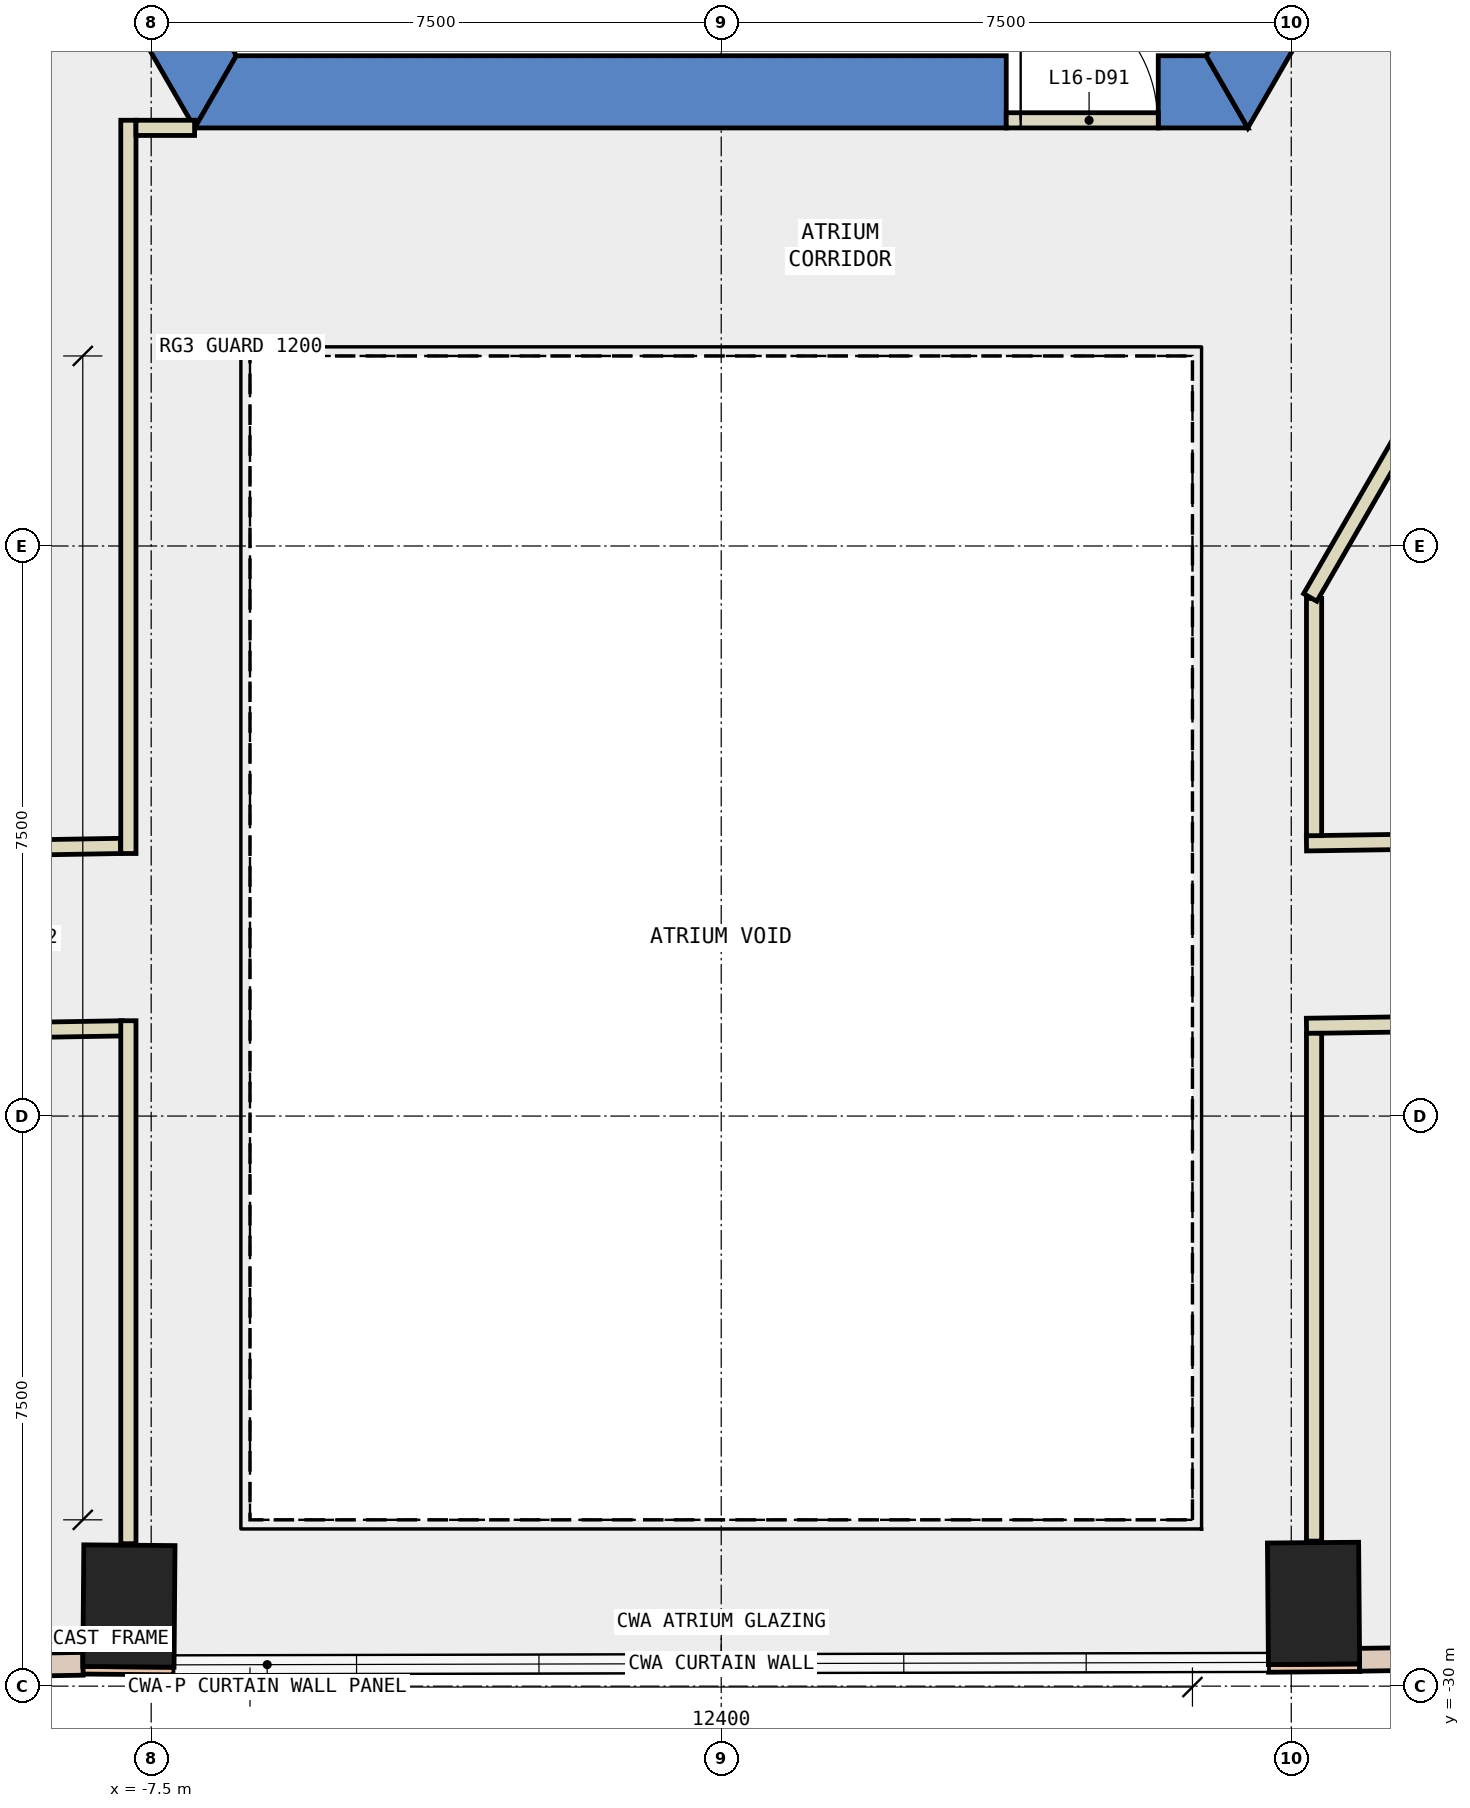
"""IFC4 building model, lengths in metres.
Left out: names, types, materials, properties, quantities, classifications, styles, units other than length and angle.
Written with IfcOpenShell. Run it as: python <this file> out.ifc"""

import sys

from ifc_helpers import new_model, si_unit, direction, frame, frame_2d, origin, origin_2d, place, context, subcontext, project, spatial, polyline, rectangle, outline, extrude, element, fill, save


model = new_model("IFC4")
c1 = context("Model", 3, precision=1e-05, world=origin(), true_north=direction((0.0, 1.0)))
c2 = subcontext(c1, "Body", "Model", "MODEL_VIEW")
j1 = project(units=[si_unit("LENGTHUNIT", "METRE"), si_unit("PLANEANGLEUNIT", "RADIAN")], contexts=[c1])
p1 = place(None, origin())
s1 = spatial("IfcSite", under=j1, at=p1, CompositionType="ELEMENT")
p2 = place(p1, origin())
s2 = spatial("IfcBuilding", under=s1, at=p2, CompositionType="ELEMENT")
p3 = place(p2, frame((0.0, 0.0, 77.0)))
s3 = spatial("IfcBuildingStorey", under=s2, at=p3, CompositionType="ELEMENT", Elevation=77.0)
for number, where, z_axis, x_axis in (
    (1, (-7.793, -28.946, -0.4), (0.0, 0.0, 1.0), (-1.0, 0.008, 0.0)),
    (2, (7.793, -28.912, -0.4), (0.0, 0.0, 1.0), (1.0, 0.008, 0.0)),
):
    element("IfcColumn", number, at=place(p3, frame(where, z_axis=z_axis, x_axis=x_axis)), inside=s3, PredefinedType="COLUMN", context=c2, shape_type="SweptSolid", body=[
        extrude(rectangle(XDim=1.2, YDim=1.6, at=origin_2d()), origin(), (0.0, 0.0, 1.0), 4.0),
    ])
p4 = place(p3, frame((0.0, 0.0, -0.4)))
e3 = element("IfcWall", 3, at=p4, inside=s3, PredefinedType="SHEAR", context=c2, shape_type="SweptSolid", body=[
    extrude(outline(polyline([(-13.856, 2.5), (-6.928, -9.5), (-6.38, -8.55), (-12.759, 2.5), (-13.856, 2.5)])), origin(), (0.0, 0.0, 1.0), 4.0),
])
p5 = place(p3, frame((0.0, 0.0, -0.4)))
e4 = element("IfcWall", 4, at=p5, inside=s3, PredefinedType="SHEAR", context=c2, shape_type="SweptSolid", body=[
    extrude(outline(polyline([(3.75, -9.5), (3.75, -8.55), (-6.38, -8.55), (-6.928, -9.5), (3.75, -9.5)])), origin(), (0.0, 0.0, 1.0), 4.0),
])
p6 = place(p3, frame((0.0, 0.0, -0.4)))
e5 = element("IfcWall", 5, at=p6, inside=s3, PredefinedType="SHEAR", context=c2, shape_type="SweptSolid", body=[
    extrude(outline(polyline([(5.75, -8.55), (5.75, -9.5), (6.928, -9.5), (6.38, -8.55), (5.75, -8.55)])), origin(), (0.0, 0.0, 1.0), 4.0),
])
p7 = place(p3, frame((0.0, 0.0, -0.4)))
e6 = element("IfcWall", 6, at=p7, inside=s3, PredefinedType="SHEAR", context=c2, shape_type="SweptSolid", body=[
    extrude(outline(polyline([(8.117, -7.44), (7.295, -6.965), (6.38, -8.55), (6.928, -9.5), (8.117, -7.44)])), origin(), (0.0, 0.0, 1.0), 4.0),
])
for number, where, z_axis, x_axis in (
    (7, (-8.4, -29.791, 0.0), (0.0, 0.0, 1.0), (1.0, -0.008, 0.0)),
    (8, (7.2, -29.767, 0.0), (0.0, 0.0, 1.0), (1.0, 0.008, 0.0)),
):
    element("IfcWall", number, at=place(p3, frame(where, z_axis=z_axis, x_axis=x_axis)), inside=s3, PredefinedType="STANDARD", context=c2, shape_type="SweptSolid", body=[
        extrude(rectangle(XDim=1.2, YDim=0.1, at=frame_2d((0.6, 0.0))), origin(), (0.0, 0.0, 1.0), 3.6),
    ])
p8 = place(p3, frame((-15.567, -29.827, 0.0), z_axis=(0.0, 0.0, 1.0), x_axis=(0.999857944706, 0.0168549817, 0.0)))
e9 = element("IfcWall", 9, at=p8, inside=s3, PredefinedType="STANDARD", context=c2, shape_type="SweptSolid", body=[
    extrude(rectangle(XDim=7.17, YDim=0.3, at=frame_2d((3.585, 0.0))), origin(), (0.0, 0.0, 1.0), 3.6),
])
p9 = place(p8, frame((0.593, 0.0, 0.9)))
e10 = element("IfcOpeningElement", 10, at=p9, cuts=e9, PredefinedType="OPENING", context=c2, shape_type="SweptSolid", body=[
    extrude(rectangle(XDim=2.4, YDim=2.6, at=frame_2d((1.2, 1.3))), frame((0.0, 0.16, 0.0), z_axis=(0.0, -1.0, 0.0), x_axis=(1.0, 0.0, 0.0)), (0.0, 0.0, 1.0), 0.32),
])
p10 = place(p8, frame((4.178, 0.0, 0.9)))
e11 = element("IfcOpeningElement", 11, at=p10, cuts=e9, PredefinedType="OPENING", context=c2, shape_type="SweptSolid", body=[
    extrude(rectangle(XDim=2.4, YDim=2.6, at=frame_2d((1.2, 1.3))), frame((0.0, 0.16, 0.0), z_axis=(0.0, -1.0, 0.0), x_axis=(1.0, 0.0, 0.0)), (0.0, 0.0, 1.0), 0.32),
])
p11 = place(p3, frame((8.398, -29.653, 0.0), z_axis=(0.0, 0.0, 1.0), x_axis=(0.999888301342, 0.014946064363, 0.0)))
e12 = element("IfcWall", 12, at=p11, inside=s3, PredefinedType="STANDARD", context=c2, shape_type="SweptSolid", body=[
    extrude(rectangle(XDim=7.171, YDim=0.3, at=frame_2d((3.585, 0.0))), origin(), (0.0, 0.0, 1.0), 3.6),
])
p12 = place(p11, frame((0.593, 0.0, 0.9)))
e13 = element("IfcOpeningElement", 13, at=p12, cuts=e12, PredefinedType="OPENING", context=c2, shape_type="SweptSolid", body=[
    extrude(rectangle(XDim=2.4, YDim=2.6, at=frame_2d((1.2, 1.3))), frame((0.0, 0.16, 0.0), z_axis=(0.0, -1.0, 0.0), x_axis=(1.0, 0.0, 0.0)), (0.0, 0.0, 1.0), 0.32),
])
p13 = place(p11, frame((4.178, 0.0, 0.9)))
e14 = element("IfcOpeningElement", 14, at=p13, cuts=e12, PredefinedType="OPENING", context=c2, shape_type="SweptSolid", body=[
    extrude(rectangle(XDim=2.4, YDim=2.6, at=frame_2d((1.2, 1.3))), frame((0.0, 0.16, 0.0), z_axis=(0.0, -1.0, 0.0), x_axis=(1.0, 0.0, 0.0)), (0.0, 0.0, 1.0), 0.32),
])
p14 = place(p3, frame((7.7, -18.912, 0.0), z_axis=(0.0, 0.0, 1.0), x_axis=(0.999888819649, 0.014911349423, 0.0)))
e15 = element("IfcWall", 15, at=p14, inside=s3, PredefinedType="PARTITIONING", context=c2, shape_type="SweptSolid", body=[
    extrude(rectangle(XDim=8.252, YDim=0.2, at=frame_2d((4.126, 0.0))), origin(), (0.0, 0.0, 1.0), 3.6),
])
p15 = place(p14, frame((3.626, 0.0, 0.0)))
e16 = element("IfcOpeningElement", 16, at=p15, cuts=e15, PredefinedType="OPENING", context=c2, shape_type="SweptSolid", body=[
    extrude(rectangle(XDim=1.0, YDim=2.1, at=frame_2d((0.5, 1.05))), frame((0.0, 0.11, 0.0), z_axis=(0.0, -1.0, 0.0), x_axis=(1.0, 0.0, 0.0)), (0.0, 0.0, 1.0), 0.22),
])
p16 = place(p3, frame((-16.298, -19.088, 0.0), z_axis=(0.0, 0.0, 1.0), x_axis=(0.999857252997, 0.016895964865, 0.0)))
e17 = element("IfcWall", 17, at=p16, inside=s3, PredefinedType="PARTITIONING", context=c2, shape_type="SweptSolid", body=[
    extrude(rectangle(XDim=8.395, YDim=0.2, at=frame_2d((4.198, 0.0))), origin(), (0.0, 0.0, 1.0), 3.6),
])
p17 = place(p16, frame((3.298, 0.0, 0.0)))
e18 = element("IfcOpeningElement", 18, at=p17, cuts=e17, PredefinedType="OPENING", context=c2, shape_type="SweptSolid", body=[
    extrude(rectangle(XDim=1.8, YDim=2.1, at=frame_2d((0.9, 1.05))), frame((0.0, 0.11, 0.0), z_axis=(0.0, -1.0, 0.0), x_axis=(1.0, 0.0, 0.0)), (0.0, 0.0, 1.0), 0.22),
])
p18 = place(p3, frame((15.999, -21.189, 0.0), z_axis=(0.0, 0.0, 1.0), x_axis=(-0.999888353348, -0.014942584753, 0.0)))
e19 = element("IfcWall", 19, at=p18, inside=s3, PredefinedType="PARTITIONING", context=c2, shape_type="SweptSolid", body=[
    extrude(rectangle(XDim=8.3, YDim=0.2, at=frame_2d((4.15, 0.0))), origin(), (0.0, 0.0, 1.0), 3.6),
])
p19 = place(p18, frame((3.55, 0.0, 0.0)))
e20 = element("IfcOpeningElement", 20, at=p19, cuts=e19, PredefinedType="OPENING", context=c2, shape_type="SweptSolid", body=[
    extrude(rectangle(XDim=1.0, YDim=2.1, at=frame_2d((0.5, 1.05))), frame((0.0, 0.11, 0.0), z_axis=(0.0, -1.0, 0.0), x_axis=(1.0, 0.0, 0.0)), (0.0, 0.0, 1.0), 0.22),
])
p20 = place(p3, frame((-7.881, -21.346, 0.0), z_axis=(0.0, 0.0, 1.0), x_axis=(-0.999857974935, -0.016853188395, 0.0)))
e21 = element("IfcWall", 21, at=p20, inside=s3, PredefinedType="PARTITIONING", context=c2, shape_type="SweptSolid", body=[
    extrude(rectangle(XDim=8.315, YDim=0.2, at=frame_2d((4.158, 0.0))), origin(), (0.0, 0.0, 1.0), 3.6),
])
p21 = place(p20, frame((3.732, 0.0, 0.0)))
e22 = element("IfcOpeningElement", 22, at=p21, cuts=e21, PredefinedType="OPENING", context=c2, shape_type="SweptSolid", body=[
    extrude(rectangle(XDim=1.0, YDim=2.1, at=frame_2d((0.5, 1.05))), frame((0.0, 0.11, 0.0), z_axis=(0.0, -1.0, 0.0), x_axis=(1.0, 0.0, 0.0)), (0.0, 0.0, 1.0), 0.22),
])
p22 = place(p3, frame((7.8, -15.69, 0.0), z_axis=(0.0, 0.0, 1.0), x_axis=(0.0, -1.0, 0.0)))
e23 = element("IfcWall", 23, at=p22, inside=s3, PredefinedType="PARTITIONING", context=c2, shape_type="SweptSolid", body=[
    extrude(rectangle(XDim=3.121, YDim=0.2, at=frame_2d((1.561, 0.0))), origin(), (0.0, 0.0, 1.0), 3.6),
])
p23 = place(p3, frame((-7.8, -19.046, 0.0), z_axis=(0.0, 0.0, 1.0), x_axis=(0.0, 1.0, 0.0)))
e24 = element("IfcWall", 24, at=p23, inside=s3, PredefinedType="PARTITIONING", context=c2, shape_type="SweptSolid", body=[
    extrude(rectangle(XDim=9.647, YDim=0.2, at=frame_2d((4.823, 0.0))), origin(), (0.0, 0.0, 1.0), 3.6),
])
p24 = place(p3, frame((-7.7, -9.499, 0.0), z_axis=(0.0, 0.0, 1.0), x_axis=(1.0, 0.0, 0.0)))
e25 = element("IfcWall", 25, at=p24, inside=s3, PredefinedType="PARTITIONING", context=c2, shape_type="SweptSolid", body=[
    extrude(rectangle(XDim=0.771, YDim=0.2, at=frame_2d((0.385, 0.0))), origin(), (0.0, 0.0, 1.0), 3.6),
])
p25 = place(p3, frame((7.8, -21.411, 0.0), z_axis=(0.0, 0.0, 1.0), x_axis=(0.0, -1.0, 0.0)))
e26 = element("IfcWall", 26, at=p25, inside=s3, PredefinedType="PARTITIONING", context=c2, shape_type="SweptSolid", body=[
    extrude(rectangle(XDim=6.681, YDim=0.2, at=frame_2d((3.341, 0.0))), origin(), (0.0, 0.0, 1.0), 3.6),
])
p26 = place(p3, frame((-7.8, -28.126, 0.0), z_axis=(0.0, 0.0, 1.0), x_axis=(0.0, 1.0, 0.0)))
e27 = element("IfcWall", 27, at=p26, inside=s3, PredefinedType="PARTITIONING", context=c2, shape_type="SweptSolid", body=[
    extrude(rectangle(XDim=6.88, YDim=0.2, at=frame_2d((3.44, 0.0))), origin(), (0.0, 0.0, 1.0), 3.6),
])
p27 = place(p3, frame((12.4, -7.621, 0.0), z_axis=(0.0, 0.0, 1.0), x_axis=(-0.49990497871, -0.866080257402, 0.0)))
e28 = element("IfcWall", 28, at=p27, inside=s3, PredefinedType="PARTITIONING", context=c2, shape_type="SweptSolid", body=[
    extrude(rectangle(XDim=9.302, YDim=0.2, at=frame_2d((4.651, 0.0))), origin(), (0.0, 0.0, 1.0), 3.6),
])
p28 = place(p3, frame((3.75, -9.4, 0.0), z_axis=(0.0, 0.0, 1.0), x_axis=(1.0, 0.0, 0.0)))
e29 = element("IfcWall", 29, at=p28, inside=s3, PredefinedType="PARTITIONING", context=c2, shape_type="SweptSolid", body=[
    extrude(rectangle(XDim=2.0, YDim=0.2, at=frame_2d((1.0, 0.0))), origin(), (0.0, 0.0, 1.0), 2.4),
])
p29 = place(p28, frame((0.19, 0.0, 0.0)))
e30 = element("IfcOpeningElement", 30, at=p29, cuts=e29, PredefinedType="OPENING", context=c2, shape_type="SweptSolid", body=[
    extrude(rectangle(XDim=1.8, YDim=2.1, at=frame_2d((0.9, 1.05))), frame((0.0, 0.11, 0.0), z_axis=(0.0, -1.0, 0.0), x_axis=(1.0, 0.0, 0.0)), (0.0, 0.0, 1.0), 0.22),
])
p30 = place(p29, origin())
e31 = element("IfcDoor", 31, at=p30, inside=s3, OperationType="DOUBLE_DOOR_SINGLE_SWING", PredefinedType="DOOR", context=c2, shape_type="SweptSolid", body=[
    extrude(rectangle(XDim=1.8, YDim=2.1, at=frame_2d((0.9, 1.05))), frame((0.0, 0.025, 0.0), z_axis=(0.0, -1.0, 0.0), x_axis=(1.0, 0.0, 0.0)), (0.0, 0.0, 1.0), 0.05),
])
fill(e30, e31)
save(model, sys.argv[1])
